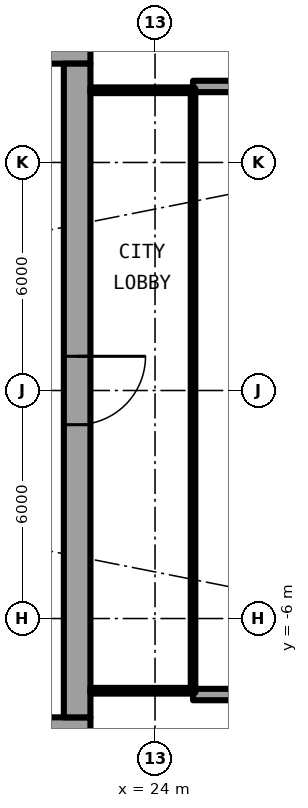
"""IFC4 building model, lengths in metres.
Left out: names, types, materials, properties, quantities, classifications, styles, units other than length and angle.
Written with IfcOpenShell. Run it as: python <this file> out.ifc"""

import sys

from ifc_helpers import new_model, si_unit, direction, frame, frame_2d, origin, place, context, subcontext, project, spatial, rectangle, extrude, element, fill, save


model = new_model("IFC4")
c1 = context("Model", 3, precision=1e-05, world=origin(), true_north=direction((0.0, 1.0)))
c2 = subcontext(c1, "Body", "Model", "MODEL_VIEW")
j1 = project(units=[si_unit("LENGTHUNIT", "METRE"), si_unit("PLANEANGLEUNIT", "RADIAN")], contexts=[c1])
p1 = place(None, origin())
s1 = spatial("IfcSite", under=j1, at=p1, CompositionType="ELEMENT")
p2 = place(p1, origin())
s2 = spatial("IfcBuilding", under=s1, at=p2, CompositionType="ELEMENT")
p3 = place(p2, frame((0.0, 0.0, 69.7)))
s3 = spatial("IfcBuildingStorey", under=s2, at=p3, CompositionType="ELEMENT", Elevation=69.7)
for number, where, z_axis, x_axis in (
    (1, (25.0, 8.0, 0.0), (0.0, 0.0, 1.0), (1.0, 0.0, 0.0)),
    (2, (25.0, -8.0, 0.0), (0.0, 0.0, 1.0), (1.0, 0.0, 0.0)),
):
    element("IfcWall", number, at=place(p3, frame(where, z_axis=z_axis, x_axis=x_axis)), inside=s3, PredefinedType="SOLIDWALL", context=c2, shape_type="SweptSolid", body=[
        extrude(rectangle(XDim=2.667, YDim=0.3, at=frame_2d((1.333, 0.0))), origin(), (0.0, 0.0, 1.0), 2.7),
    ])
p4 = place(p3, frame((22.3, 8.95, 0.0), z_axis=(0.0, 0.0, 1.0), x_axis=(-1.0, 0.0, 0.0)))
e3 = element("IfcWall", 3, at=p4, inside=s3, PredefinedType="SHEAR", context=c2, shape_type="SweptSolid", body=[
    extrude(rectangle(XDim=14.0, YDim=0.7, at=frame_2d((7.0, 0.0))), origin(), (0.0, 0.0, 1.0), 3.05),
])
p5 = place(p4, frame((1.225, 0.0, 0.0)))
e4 = element("IfcOpeningElement", 4, at=p5, cuts=e3, PredefinedType="OPENING", context=c2, shape_type="SweptSolid", body=[
    extrude(rectangle(XDim=1.2, YDim=2.3, at=frame_2d((0.6, 1.15))), frame((0.0, 0.36, 0.0), z_axis=(0.0, -1.0, 0.0), x_axis=(1.0, 0.0, 0.0)), (0.0, 0.0, 1.0), 0.72),
])
p6 = place(p3, frame((8.3, -8.95, 0.0), z_axis=(0.0, 0.0, 1.0), x_axis=(1.0, 0.0, 0.0)))
e5 = element("IfcWall", 5, at=p6, inside=s3, PredefinedType="SHEAR", context=c2, shape_type="SweptSolid", body=[
    extrude(rectangle(XDim=14.0, YDim=0.7, at=frame_2d((7.0, 0.0))), origin(), (0.0, 0.0, 1.0), 3.05),
])
p7 = place(p6, frame((11.575, 0.0, 0.0)))
e6 = element("IfcOpeningElement", 6, at=p7, cuts=e5, PredefinedType="OPENING", context=c2, shape_type="SweptSolid", body=[
    extrude(rectangle(XDim=1.2, YDim=2.3, at=frame_2d((0.6, 1.15))), frame((0.0, 0.36, 0.0), z_axis=(0.0, -1.0, 0.0), x_axis=(1.0, 0.0, 0.0)), (0.0, 0.0, 1.0), 0.72),
])
p8 = place(p3, frame((21.95, 8.6, 0.0), z_axis=(0.0, 0.0, 1.0), x_axis=(0.0, -1.0, 0.0)))
e7 = element("IfcWall", 7, at=p8, inside=s3, PredefinedType="SHEAR", context=c2, shape_type="SweptSolid", body=[
    extrude(rectangle(XDim=17.2, YDim=0.7, at=frame_2d((8.6, 0.0))), origin(), (0.0, 0.0, 1.0), 3.05),
])
p9 = place(p8, frame((7.7, 0.0, 0.0)))
e8 = element("IfcOpeningElement", 8, at=p9, cuts=e7, PredefinedType="OPENING", context=c2, shape_type="SweptSolid", body=[
    extrude(rectangle(XDim=1.8, YDim=2.3, at=frame_2d((0.9, 1.15))), frame((0.0, 0.36, 0.0), z_axis=(0.0, -1.0, 0.0), x_axis=(1.0, 0.0, 0.0)), (0.0, 0.0, 1.0), 0.72),
])
for number, where, z_axis, x_axis in (
    (9, (22.3, -7.9, 0.0), (0.0, 0.0, 1.0), (1.0, 0.0, 0.0)),
    (10, (22.3, 7.9, 0.0), (0.0, 0.0, 1.0), (1.0, 0.0, 0.0)),
):
    element("IfcWall", number, at=place(p3, frame(where, z_axis=z_axis, x_axis=x_axis)), inside=s3, PredefinedType="PARTITIONING", context=c2, shape_type="SweptSolid", body=[
        extrude(rectangle(XDim=2.64, YDim=0.15, at=frame_2d((1.32, 0.0))), origin(), (0.0, 0.0, 1.0), 2.7),
    ])
p10 = place(p3, frame((25.0, -7.95, 0.0), z_axis=(0.0, 0.0, 1.0), x_axis=(0.0, 1.0, 0.0)))
e11 = element("IfcWall", 11, at=p10, inside=s3, PredefinedType="PARTITIONING", context=c2, shape_type="SweptSolid", body=[
    extrude(rectangle(XDim=15.9, YDim=0.12, at=frame_2d((7.95, 0.0))), origin(), (0.0, 0.0, 1.0), 2.7),
])
p11 = place(p10, frame((0.95, 0.0, 0.1)))
e12 = element("IfcOpeningElement", 12, at=p11, cuts=e11, PredefinedType="OPENING", context=c2, shape_type="SweptSolid", body=[
    extrude(rectangle(XDim=14.0, YDim=2.35, at=frame_2d((7.0, 1.175))), frame((0.0, 0.07, 0.0), z_axis=(0.0, -1.0, 0.0), x_axis=(1.0, 0.0, 0.0)), (0.0, 0.0, 1.0), 0.14),
])
p12 = place(p9, origin())
e13 = element("IfcDoor", 13, at=p12, inside=s3, OperationType="SINGLE_SWING_LEFT", PredefinedType="DOOR", context=c2, shape_type="SweptSolid", body=[
    extrude(rectangle(XDim=1.8, YDim=2.3, at=frame_2d((0.9, 1.15))), frame((0.0, 0.025, 0.0), z_axis=(0.0, -1.0, 0.0), x_axis=(1.0, 0.0, 0.0)), (0.0, 0.0, 1.0), 0.05),
])
fill(e8, e13)
p13 = place(p11, origin())
e14 = element("IfcWindow", 14, at=p13, inside=s3, PartitioningType="SINGLE_PANEL", PredefinedType="WINDOW", context=c2, shape_type="SweptSolid", body=[
    extrude(rectangle(XDim=14.0, YDim=2.35, at=frame_2d((7.0, 1.175))), frame((0.0, 0.03, 0.0), z_axis=(0.0, -1.0, 0.0), x_axis=(1.0, 0.0, 0.0)), (0.0, 0.0, 1.0), 0.06),
])
fill(e12, e14)
save(model, sys.argv[1])
